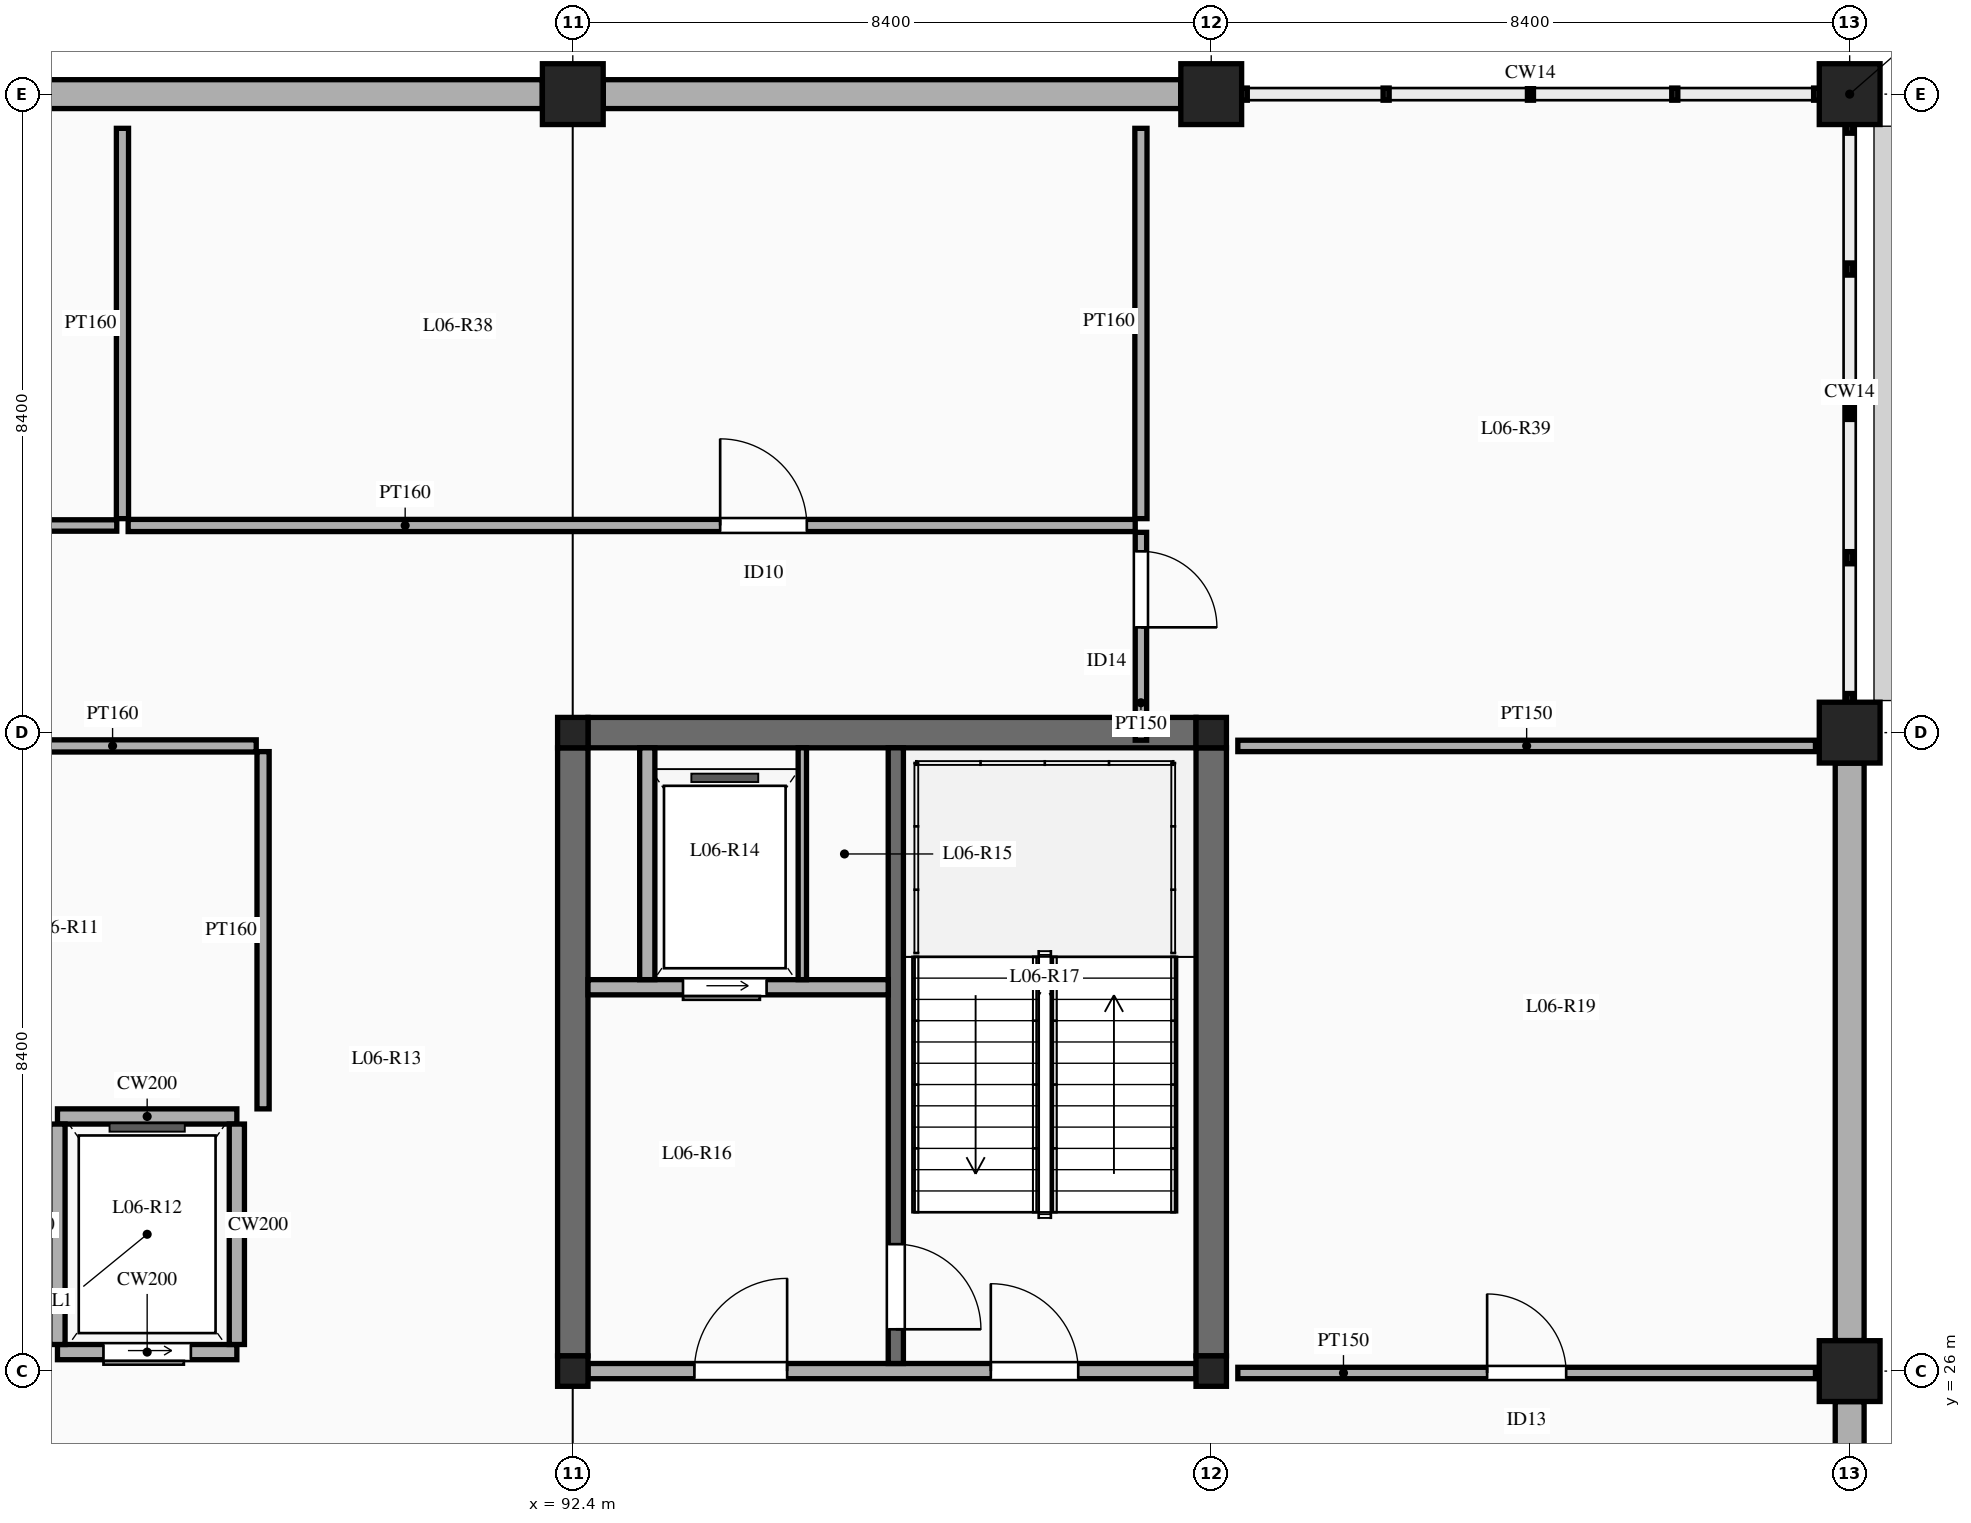
"""IFC4 building model, lengths in metres.
Left out: names, types, materials, properties, quantities, classifications, styles, units other than length and angle.
Written with IfcOpenShell. Run it as: python <this file> out.ifc"""

import sys

from ifc_helpers import new_model, si_unit, direction, frame, frame_2d, origin, origin_2d, place, context, subcontext, project, spatial, rectangle, extrude, element, fill, save


model = new_model("IFC4")
c1 = context("Model", 3, precision=1e-05, world=origin(), true_north=direction((0.0, 1.0)))
c2 = subcontext(c1, "Body", "Model", "MODEL_VIEW")
j1 = project(units=[si_unit("LENGTHUNIT", "METRE"), si_unit("PLANEANGLEUNIT", "RADIAN")], contexts=[c1])
p1 = place(None, origin())
s1 = spatial("IfcSite", under=j1, at=p1, CompositionType="ELEMENT")
p2 = place(p1, origin())
s2 = spatial("IfcBuilding", under=s1, at=p2, CompositionType="ELEMENT")
p3 = place(p2, frame((0.0, 0.0, 28.5)))
s3 = spatial("IfcBuildingStorey", under=s2, at=p3, CompositionType="ELEMENT", Elevation=28.5)
for number, where, z_axis, x_axis in (
    (1, (92.4, 26.0, 0.0), (0.0, 0.0, 1.0), (1.0, 0.0, 0.0)),
    (2, (92.4, 34.4, 0.0), (0.0, 0.0, 1.0), (1.0, 0.0, 0.0)),
):
    element("IfcColumn", number, at=place(p3, frame(where, z_axis=z_axis, x_axis=x_axis)), inside=s3, PredefinedType="COLUMN", context=c2, shape_type="SweptSolid", body=[
        extrude(rectangle(XDim=0.4, YDim=0.4, at=origin_2d()), origin(), (0.0, 0.0, 1.0), 4.5),
    ])
p4 = place(p3, frame((92.4, 42.8, 0.0), z_axis=(0.0, 0.0, 1.0), x_axis=(1.0, 0.0, 0.0)))
e3 = element("IfcColumn", 3, at=p4, inside=s3, PredefinedType="COLUMN", context=c2, shape_type="SweptSolid", body=[
    extrude(rectangle(XDim=0.8, YDim=0.8, at=origin_2d()), origin(), (0.0, 0.0, 1.0), 4.5),
])
for number, where, z_axis, x_axis in (
    (4, (100.8, 26.0, 0.0), (0.0, 0.0, 1.0), (1.0, 0.0, 0.0)),
    (5, (100.8, 34.4, 0.0), (0.0, 0.0, 1.0), (1.0, 0.0, 0.0)),
):
    element("IfcColumn", number, at=place(p3, frame(where, z_axis=z_axis, x_axis=x_axis)), inside=s3, PredefinedType="COLUMN", context=c2, shape_type="SweptSolid", body=[
        extrude(rectangle(XDim=0.4, YDim=0.4, at=origin_2d()), origin(), (0.0, 0.0, 1.0), 4.5),
    ])
for number, where, z_axis, x_axis in (
    (6, (100.8, 42.8, 0.0), (0.0, 0.0, 1.0), (1.0, 0.0, 0.0)),
    (7, (109.2, 26.0, 0.0), (0.0, 0.0, 1.0), (1.0, 0.0, 0.0)),
    (8, (109.2, 34.4, 0.0), (0.0, 0.0, 1.0), (1.0, 0.0, 0.0)),
    (9, (109.2, 42.8, 0.0), (0.0, 0.0, 1.0), (1.0, 0.0, 0.0)),
):
    element("IfcColumn", number, at=place(p3, frame(where, z_axis=z_axis, x_axis=x_axis)), inside=s3, PredefinedType="COLUMN", context=c2, shape_type="SweptSolid", body=[
        extrude(rectangle(XDim=0.8, YDim=0.8, at=origin_2d()), origin(), (0.0, 0.0, 1.0), 4.5),
    ])
for number, where, z_axis, x_axis in (
    (10, (92.4, 26.2, 0.0), (0.0, 0.0, 1.0), (0.0, 1.0, 0.0)),
    (11, (100.8, 26.2, 0.0), (0.0, 0.0, 1.0), (0.0, 1.0, 0.0)),
    (12, (92.6, 34.4, 0.0), (0.0, 0.0, 1.0), (1.0, 0.0, 0.0)),
):
    element("IfcWall", number, at=place(p3, frame(where, z_axis=z_axis, x_axis=x_axis)), inside=s3, PredefinedType="SHEAR", context=c2, shape_type="SweptSolid", body=[
        extrude(rectangle(XDim=8.0, YDim=0.4, at=frame_2d((4.0, 0.0))), origin(), (0.0, 0.0, 1.0), 4.5),
    ])
for number, where, z_axis, x_axis in (
    (13, (84.402, 42.8, 0.0), (0.0, 0.0, 1.0), (1.0, 0.0, 0.0)),
    (14, (92.802, 42.8, 0.0), (0.0, 0.0, 1.0), (1.0, 0.0, 0.0)),
    (15, (109.2, 18.002, 0.0), (0.0, 0.0, 1.0), (0.0, 1.0, 0.0)),
    (16, (109.2, 26.402, 0.0), (0.0, 0.0, 1.0), (0.0, 1.0, 0.0)),
):
    element("IfcWall", number, at=place(p3, frame(where, z_axis=z_axis, x_axis=x_axis)), inside=s3, PredefinedType="SOLIDWALL", context=c2, shape_type="SweptSolid", body=[
        extrude(rectangle(XDim=7.596, YDim=0.38, at=frame_2d((3.798, 0.0))), origin(), (0.0, 0.0, 1.0), 3.55),
    ])
p5 = place(p3, frame((92.6, 26.0, 0.0), z_axis=(0.0, 0.0, 1.0), x_axis=(1.0, 0.0, 0.0)))
e17 = element("IfcWall", 17, at=p5, inside=s3, PredefinedType="SOLIDWALL", context=c2, shape_type="SweptSolid", body=[
    extrude(rectangle(XDim=8.0, YDim=0.2, at=frame_2d((4.0, 0.0))), origin(), (0.0, 0.0, 1.0), 3.78),
])
p6 = place(p5, frame((1.4, 0.0, 0.0)))
e18 = element("IfcOpeningElement", 18, at=p6, cuts=e17, PredefinedType="OPENING", context=c2, shape_type="SweptSolid", body=[
    extrude(rectangle(XDim=1.22, YDim=2.15, at=frame_2d((0.61, 1.075))), frame((0.0, 0.11, 0.0), z_axis=(0.0, -1.0, 0.0), x_axis=(1.0, 0.0, 0.0)), (0.0, 0.0, 1.0), 0.22),
])
p7 = place(p5, frame((5.3, 0.0, 0.0)))
e19 = element("IfcOpeningElement", 19, at=p7, cuts=e17, PredefinedType="OPENING", context=c2, shape_type="SweptSolid", body=[
    extrude(rectangle(XDim=1.15, YDim=2.15, at=frame_2d((0.575, 1.075))), frame((0.0, 0.11, 0.0), z_axis=(0.0, -1.0, 0.0), x_axis=(1.0, 0.0, 0.0)), (0.0, 0.0, 1.0), 0.22),
])
p8 = place(p3, frame((96.65, 26.1, 0.0), z_axis=(0.0, 0.0, 1.0), x_axis=(0.0, 1.0, 0.0)))
e20 = element("IfcWall", 20, at=p8, inside=s3, PredefinedType="SOLIDWALL", context=c2, shape_type="SweptSolid", body=[
    extrude(rectangle(XDim=8.1, YDim=0.2, at=frame_2d((4.05, 0.0))), origin(), (0.0, 0.0, 1.0), 4.3),
])
p9 = place(p8, frame((0.45, 0.0, 0.0)))
e21 = element("IfcOpeningElement", 21, at=p9, cuts=e20, PredefinedType="OPENING", context=c2, shape_type="SweptSolid", body=[
    extrude(rectangle(XDim=1.12, YDim=2.15, at=frame_2d((0.56, 1.075))), frame((0.0, 0.11, 0.0), z_axis=(0.0, -1.0, 0.0), x_axis=(1.0, 0.0, 0.0)), (0.0, 0.0, 1.0), 0.22),
])
p10 = place(p3, frame((92.6, 31.05, 0.0), z_axis=(0.0, 0.0, 1.0), x_axis=(1.0, 0.0, 0.0)))
e22 = element("IfcWall", 22, at=p10, inside=s3, PredefinedType="SOLIDWALL", context=c2, shape_type="SweptSolid", body=[
    extrude(rectangle(XDim=3.95, YDim=0.2, at=frame_2d((1.975, 0.0))), origin(), (0.0, 0.0, 1.0), 4.3),
])
p11 = place(p10, frame((1.25, 0.0, 0.0)))
e23 = element("IfcOpeningElement", 23, at=p11, cuts=e22, PredefinedType="OPENING", context=c2, shape_type="SweptSolid", body=[
    extrude(rectangle(XDim=1.1, YDim=2.15, at=frame_2d((0.55, 1.075))), frame((0.0, 0.11, 0.0), z_axis=(0.0, -1.0, 0.0), x_axis=(1.0, 0.0, 0.0)), (0.0, 0.0, 1.0), 0.22),
])
p12 = place(p3, frame((95.42, 31.15, 0.0), z_axis=(0.0, 0.0, 1.0), x_axis=(0.0, 1.0, 0.0)))
e24 = element("IfcWall", 24, at=p12, inside=s3, PredefinedType="PARTITIONING", context=c2, shape_type="SweptSolid", body=[
    extrude(rectangle(XDim=3.05, YDim=0.11, at=frame_2d((1.525, 0.0))), origin(), (0.0, 0.0, 1.0), 4.3),
])
p13 = place(p3, frame((93.38, 31.15, 0.0), z_axis=(0.0, 0.0, 1.0), x_axis=(0.0, 1.0, 0.0)))
e25 = element("IfcWall", 25, at=p13, inside=s3, PredefinedType="SOLIDWALL", context=c2, shape_type="SweptSolid", body=[
    extrude(rectangle(XDim=3.05, YDim=0.2, at=frame_2d((1.525, 0.0))), origin(), (0.0, 0.0, 1.0), 4.3),
])
p14 = place(p3, frame((85.62, 26.25, 0.0), z_axis=(0.0, 0.0, 1.0), x_axis=(1.0, 0.0, 0.0)))
e26 = element("IfcWall", 26, at=p14, inside=s3, PredefinedType="SOLIDWALL", context=c2, shape_type="SweptSolid", body=[
    extrude(rectangle(XDim=2.36, YDim=0.2, at=frame_2d((1.18, 0.0))), origin(), (0.0, 0.0, 1.0), 3.78),
])
p15 = place(p14, frame((0.605, 0.0, 0.0)))
e27 = element("IfcOpeningElement", 27, at=p15, cuts=e26, PredefinedType="OPENING", context=c2, shape_type="SweptSolid", body=[
    extrude(rectangle(XDim=1.15, YDim=2.2, at=frame_2d((0.575, 1.1))), frame((0.0, 0.11, 0.0), z_axis=(0.0, -1.0, 0.0), x_axis=(1.0, 0.0, 0.0)), (0.0, 0.0, 1.0), 0.22),
])
p16 = place(p3, frame((85.62, 29.35, 0.0), z_axis=(0.0, 0.0, 1.0), x_axis=(1.0, 0.0, 0.0)))
e28 = element("IfcWall", 28, at=p16, inside=s3, PredefinedType="SOLIDWALL", context=c2, shape_type="SweptSolid", body=[
    extrude(rectangle(XDim=2.36, YDim=0.2, at=frame_2d((1.18, 0.0))), origin(), (0.0, 0.0, 1.0), 4.3),
])
p17 = place(p3, frame((85.62, 26.35, 0.0), z_axis=(0.0, 0.0, 1.0), x_axis=(0.0, 1.0, 0.0)))
e29 = element("IfcWall", 29, at=p17, inside=s3, PredefinedType="SOLIDWALL", context=c2, shape_type="SweptSolid", body=[
    extrude(rectangle(XDim=2.9, YDim=0.2, at=frame_2d((1.45, 0.0))), origin(), (0.0, 0.0, 1.0), 4.3),
])
p18 = place(p3, frame((87.98, 26.35, 0.0), z_axis=(0.0, 0.0, 1.0), x_axis=(0.0, 1.0, 0.0)))
e30 = element("IfcWall", 30, at=p18, inside=s3, PredefinedType="SOLIDWALL", context=c2, shape_type="SweptSolid", body=[
    extrude(rectangle(XDim=2.9, YDim=0.2, at=frame_2d((1.45, 0.0))), origin(), (0.0, 0.0, 1.0), 3.98),
])
p19 = place(p3, frame((88.325, 29.45, 0.0), z_axis=(0.0, 0.0, 1.0), x_axis=(0.0, 1.0, 0.0)))
e31 = element("IfcWall", 31, at=p19, inside=s3, PredefinedType="PARTITIONING", context=c2, shape_type="SweptSolid", body=[
    extrude(rectangle(XDim=4.7, YDim=0.16, at=frame_2d((2.35, 0.0))), origin(), (0.0, 0.0, 1.0), 3.45),
])
p20 = place(p3, frame((84.455, 34.225, 0.0), z_axis=(0.0, 0.0, 1.0), x_axis=(1.0, 0.0, 0.0)))
e32 = element("IfcWall", 32, at=p20, inside=s3, PredefinedType="PARTITIONING", context=c2, shape_type="SweptSolid", body=[
    extrude(rectangle(XDim=3.78, YDim=0.16, at=frame_2d((1.89, 0.0))), origin(), (0.0, 0.0, 1.0), 3.45),
])
p21 = place(p3, frame((101.15, 25.975, 0.0), z_axis=(0.0, 0.0, 1.0), x_axis=(1.0, 0.0, 0.0)))
e33 = element("IfcWall", 33, at=p21, inside=s3, PredefinedType="PARTITIONING", context=c2, shape_type="SweptSolid", body=[
    extrude(rectangle(XDim=7.6, YDim=0.15, at=frame_2d((3.8, 0.0))), origin(), (0.0, 0.0, 1.0), 3.45),
])
p22 = place(p21, frame((3.28, 0.0, 0.0)))
e34 = element("IfcOpeningElement", 34, at=p22, cuts=e33, PredefinedType="OPENING", context=c2, shape_type="SweptSolid", body=[
    extrude(rectangle(XDim=1.04, YDim=2.15, at=frame_2d((0.52, 1.075))), frame((0.0, 0.085, 0.0), z_axis=(0.0, -1.0, 0.0), x_axis=(1.0, 0.0, 0.0)), (0.0, 0.0, 1.0), 0.17),
])
p23 = place(p3, frame((101.15, 34.225, 0.0), z_axis=(0.0, 0.0, 1.0), x_axis=(1.0, 0.0, 0.0)))
e35 = element("IfcWall", 35, at=p23, inside=s3, PredefinedType="PARTITIONING", context=c2, shape_type="SweptSolid", body=[
    extrude(rectangle(XDim=7.6, YDim=0.15, at=frame_2d((3.8, 0.0))), origin(), (0.0, 0.0, 1.0), 3.45),
])
p24 = place(p3, frame((73.15, 37.125, 0.0), z_axis=(0.0, 0.0, 1.0), x_axis=(1.0, 0.0, 0.0)))
e36 = element("IfcWall", 36, at=p24, inside=s3, PredefinedType="PARTITIONING", context=c2, shape_type="SweptSolid", body=[
    extrude(rectangle(XDim=13.25, YDim=0.15, at=frame_2d((6.625, 0.0))), origin(), (0.0, 0.0, 1.0), 3.45),
])
p25 = place(p24, frame((6.125, 0.0, 0.0)))
e37 = element("IfcOpeningElement", 37, at=p25, cuts=e36, PredefinedType="OPENING", context=c2, shape_type="SweptSolid", body=[
    extrude(rectangle(XDim=1.0, YDim=2.15, at=frame_2d((0.5, 1.075))), frame((0.0, 0.085, 0.0), z_axis=(0.0, -1.0, 0.0), x_axis=(1.0, 0.0, 0.0)), (0.0, 0.0, 1.0), 0.17),
])
p26 = place(p3, frame((86.55, 37.125, 0.0), z_axis=(0.0, 0.0, 1.0), x_axis=(1.0, 0.0, 0.0)))
e38 = element("IfcWall", 38, at=p26, inside=s3, PredefinedType="PARTITIONING", context=c2, shape_type="SweptSolid", body=[
    extrude(rectangle(XDim=13.25, YDim=0.16, at=frame_2d((6.625, 0.0))), origin(), (0.0, 0.0, 1.0), 3.45),
])
p27 = place(p26, frame((7.789, 0.0, 0.0)))
e39 = element("IfcOpeningElement", 39, at=p27, cuts=e38, PredefinedType="OPENING", context=c2, shape_type="SweptSolid", body=[
    extrude(rectangle(XDim=1.14, YDim=2.22, at=frame_2d((0.57, 1.11))), frame((0.0, 0.09, 0.0), z_axis=(0.0, -1.0, 0.0), x_axis=(1.0, 0.0, 0.0)), (0.0, 0.0, 1.0), 0.18),
])
p28 = place(p3, frame((99.875, 34.3, 0.0), z_axis=(0.0, 0.0, 1.0), x_axis=(0.0, 1.0, 0.0)))
e40 = element("IfcWall", 40, at=p28, inside=s3, PredefinedType="PARTITIONING", context=c2, shape_type="SweptSolid", body=[
    extrude(rectangle(XDim=2.735, YDim=0.15, at=frame_2d((1.367, 0.0))), origin(), (0.0, 0.0, 1.0), 3.45),
])
p29 = place(p28, frame((1.485, 0.0, 0.0)))
e41 = element("IfcOpeningElement", 41, at=p29, cuts=e40, PredefinedType="OPENING", context=c2, shape_type="SweptSolid", body=[
    extrude(rectangle(XDim=1.0, YDim=2.15, at=frame_2d((0.5, 1.075))), frame((0.0, 0.085, 0.0), z_axis=(0.0, -1.0, 0.0), x_axis=(1.0, 0.0, 0.0)), (0.0, 0.0, 1.0), 0.17),
])
for number, where, z_axis, x_axis in (
    (42, (86.475, 37.215, 0.0), (0.0, 0.0, 1.0), (0.0, 1.0, 0.0)),
    (43, (99.875, 37.215, 0.0), (0.0, 0.0, 1.0), (0.0, 1.0, 0.0)),
):
    element("IfcWall", number, at=place(p3, frame(where, z_axis=z_axis, x_axis=x_axis)), inside=s3, PredefinedType="PARTITIONING", context=c2, shape_type="SweptSolid", body=[
        extrude(rectangle(XDim=5.135, YDim=0.16, at=frame_2d((2.567, 0.0))), origin(), (0.0, 0.0, 1.0), 3.45),
    ])
p30 = place(p6, origin())
e44 = element("IfcDoor", 44, at=p30, inside=s3, OperationType="SINGLE_SWING_RIGHT", PredefinedType="DOOR", context=c2, shape_type="SweptSolid", body=[
    extrude(rectangle(XDim=1.22, YDim=2.15, at=frame_2d((0.61, 1.075))), frame((0.0, 0.025, 0.0), z_axis=(0.0, -1.0, 0.0), x_axis=(1.0, 0.0, 0.0)), (0.0, 0.0, 1.0), 0.05),
])
fill(e18, e44)
p31 = place(p7, origin())
e45 = element("IfcDoor", 45, at=p31, inside=s3, OperationType="SINGLE_SWING_LEFT", PredefinedType="DOOR", context=c2, shape_type="SweptSolid", body=[
    extrude(rectangle(XDim=1.15, YDim=2.15, at=frame_2d((0.575, 1.075))), frame((0.0, 0.025, 0.0), z_axis=(0.0, -1.0, 0.0), x_axis=(1.0, 0.0, 0.0)), (0.0, 0.0, 1.0), 0.05),
])
fill(e19, e45)
p32 = place(p9, frame((1.12, 0.0, 0.0), z_axis=(0.0, 0.0, 1.0), x_axis=(-1.0, 0.0, 0.0)))
e46 = element("IfcDoor", 46, at=p32, inside=s3, OperationType="SINGLE_SWING_RIGHT", PredefinedType="DOOR", context=c2, shape_type="SweptSolid", body=[
    extrude(rectangle(XDim=1.12, YDim=2.15, at=frame_2d((0.56, 1.075))), frame((0.0, 0.025, 0.0), z_axis=(0.0, -1.0, 0.0), x_axis=(1.0, 0.0, 0.0)), (0.0, 0.0, 1.0), 0.05),
])
fill(e21, e46)
p33 = place(p11, frame((1.1, 0.0, 0.0), z_axis=(0.0, 0.0, 1.0), x_axis=(-1.0, 0.0, 0.0)))
e47 = element("IfcDoor", 47, at=p33, inside=s3, OperationType="SLIDING_TO_LEFT", PredefinedType="DOOR", context=c2, shape_type="SweptSolid", body=[
    extrude(rectangle(XDim=1.1, YDim=2.15, at=frame_2d((0.55, 1.075))), frame((0.0, 0.025, 0.0), z_axis=(0.0, -1.0, 0.0), x_axis=(1.0, 0.0, 0.0)), (0.0, 0.0, 1.0), 0.05),
])
fill(e23, e47)
p34 = place(p15, frame((1.15, 0.0, 0.0), z_axis=(0.0, 0.0, 1.0), x_axis=(-1.0, 0.0, 0.0)))
e48 = element("IfcDoor", 48, at=p34, inside=s3, OperationType="SLIDING_TO_LEFT", PredefinedType="DOOR", context=c2, shape_type="SweptSolid", body=[
    extrude(rectangle(XDim=1.15, YDim=2.2, at=frame_2d((0.575, 1.1))), frame((0.0, 0.025, 0.0), z_axis=(0.0, -1.0, 0.0), x_axis=(1.0, 0.0, 0.0)), (0.0, 0.0, 1.0), 0.05),
])
fill(e27, e48)
p35 = place(p22, origin())
e49 = element("IfcDoor", 49, at=p35, inside=s3, OperationType="SINGLE_SWING_LEFT", PredefinedType="DOOR", context=c2, shape_type="SweptSolid", body=[
    extrude(rectangle(XDim=1.04, YDim=2.15, at=frame_2d((0.52, 1.075))), frame((0.0, 0.025, 0.0), z_axis=(0.0, -1.0, 0.0), x_axis=(1.0, 0.0, 0.0)), (0.0, 0.0, 1.0), 0.05),
])
fill(e34, e49)
p36 = place(p27, origin())
e50 = element("IfcDoor", 50, at=p36, inside=s3, OperationType="SINGLE_SWING_LEFT", PredefinedType="DOOR", context=c2, shape_type="SweptSolid", body=[
    extrude(rectangle(XDim=1.14, YDim=2.22, at=frame_2d((0.57, 1.11))), frame((0.0, 0.025, 0.0), z_axis=(0.0, -1.0, 0.0), x_axis=(1.0, 0.0, 0.0)), (0.0, 0.0, 1.0), 0.05),
])
fill(e39, e50)
p37 = place(p29, frame((1.0, 0.0, 0.0), z_axis=(0.0, 0.0, 1.0), x_axis=(-1.0, 0.0, 0.0)))
e51 = element("IfcDoor", 51, at=p37, inside=s3, OperationType="SINGLE_SWING_RIGHT", PredefinedType="DOOR", context=c2, shape_type="SweptSolid", body=[
    extrude(rectangle(XDim=1.0, YDim=2.15, at=frame_2d((0.5, 1.075))), frame((0.0, 0.025, 0.0), z_axis=(0.0, -1.0, 0.0), x_axis=(1.0, 0.0, 0.0)), (0.0, 0.0, 1.0), 0.05),
])
fill(e41, e51)
save(model, sys.argv[1])
